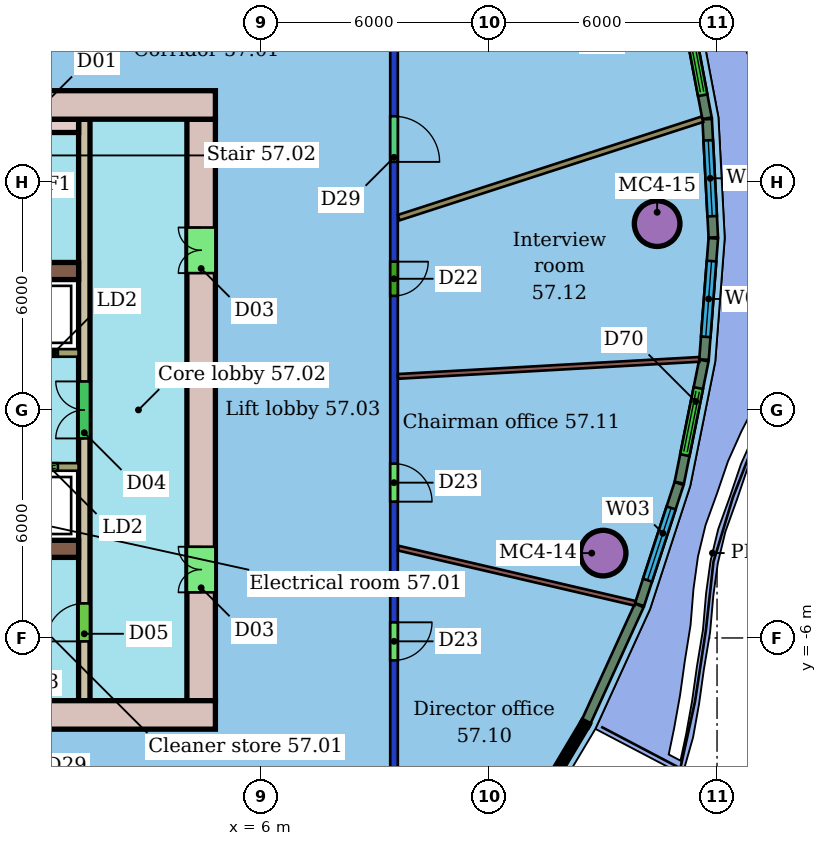
"""IFC4 building model, lengths in metres.
Left out: names, types, materials, properties, quantities, classifications, styles, units other than length and angle.
Written with IfcOpenShell. Run it as: python <this file> out.ifc"""

import sys

from ifc_helpers import new_model, si_unit, direction, frame, frame_2d, origin, origin_2d, place, context, subcontext, project, spatial, rectangle, hollow_circle, extrude, element, fill, save


model = new_model("IFC4")
c1 = context("Model", 3, precision=1e-05, world=origin(), true_north=direction((0.0, 1.0)))
c2 = subcontext(c1, "Body", "Model", "MODEL_VIEW")
j1 = project(units=[si_unit("LENGTHUNIT", "METRE"), si_unit("PLANEANGLEUNIT", "RADIAN")], contexts=[c1])
p1 = place(None, origin())
s1 = spatial("IfcSite", under=j1, at=p1, CompositionType="ELEMENT")
p2 = place(p1, origin())
s2 = spatial("IfcBuilding", under=s1, at=p2, CompositionType="ELEMENT")
p3 = place(p2, frame((0.0, 0.0, 231.7)))
s3 = spatial("IfcBuildingStorey", under=s2, at=p3, CompositionType="ELEMENT", Elevation=231.7)
for number, where, z_axis, x_axis in (
    (1, (15.003, -3.768, 0.0), (0.0, 0.0, 1.0), (1.0, 0.0, 0.0)),
    (2, (16.424, 4.901, 0.0), (0.0, 0.0, 1.0), (1.0, 0.0, 0.0)),
):
    element("IfcColumn", number, at=place(p3, frame(where, z_axis=z_axis, x_axis=x_axis)), inside=s3, PredefinedType="COLUMN", context=c2, shape_type="SweptSolid", body=[
        extrude(hollow_circle(Radius=0.6, WallThickness=0.045, at=origin_2d()), origin(), (0.0, 0.0, 1.0), 3.45),
    ])
p4 = place(p3, frame((9.5, 10.4, 0.0), z_axis=(0.0, 0.0, 1.0), x_axis=(0.0, -1.0, 0.0)))
e3 = element("IfcWall", 3, at=p4, inside=s3, PredefinedType="PARTITIONING", context=c2, shape_type="SweptSolid", body=[
    extrude(rectangle(XDim=20.8, YDim=0.2, at=frame_2d((10.4, 0.0))), origin(), (0.0, 0.0, 1.0), 3.05),
])
p5 = place(p4, frame((15.989, 0.0, 0.0)))
e4 = element("IfcOpeningElement", 4, at=p5, cuts=e3, PredefinedType="OPENING", context=c2, shape_type="SweptSolid", body=[
    extrude(rectangle(XDim=1.0, YDim=2.4, at=frame_2d((0.5, 1.2))), frame((0.0, 0.11, 0.0), z_axis=(0.0, -1.0, 0.0), x_axis=(1.0, 0.0, 0.0)), (0.0, 0.0, 1.0), 0.22),
])
p6 = place(p4, frame((11.814, 0.0, 0.0)))
e5 = element("IfcOpeningElement", 5, at=p6, cuts=e3, PredefinedType="OPENING", context=c2, shape_type="SweptSolid", body=[
    extrude(rectangle(XDim=1.0, YDim=2.4, at=frame_2d((0.5, 1.2))), frame((0.0, 0.11, 0.0), z_axis=(0.0, -1.0, 0.0), x_axis=(1.0, 0.0, 0.0)), (0.0, 0.0, 1.0), 0.22),
])
p7 = place(p4, frame((6.499, 0.0, 0.0)))
e6 = element("IfcOpeningElement", 6, at=p7, cuts=e3, PredefinedType="OPENING", context=c2, shape_type="SweptSolid", body=[
    extrude(rectangle(XDim=0.9, YDim=2.1, at=frame_2d((0.45, 1.05))), frame((0.0, 0.11, 0.0), z_axis=(0.0, -1.0, 0.0), x_axis=(1.0, 0.0, 0.0)), (0.0, 0.0, 1.0), 0.22),
])
p8 = place(p4, frame((2.673, 0.0, 0.0)))
e7 = element("IfcOpeningElement", 7, at=p8, cuts=e3, PredefinedType="OPENING", context=c2, shape_type="SweptSolid", body=[
    extrude(rectangle(XDim=1.2, YDim=2.4, at=frame_2d((0.6, 1.2))), frame((0.0, 0.11, 0.0), z_axis=(0.0, -1.0, 0.0), x_axis=(1.0, 0.0, 0.0)), (0.0, 0.0, 1.0), 0.22),
])
p9 = place(p3, frame((15.841, -5.087, 0.0), z_axis=(0.0, 0.0, 1.0), x_axis=(-0.973929013139, 0.226852986241, 0.0)))
e8 = element("IfcWall", 8, at=p9, inside=s3, PredefinedType="PARTITIONING", context=c2, shape_type="SweptSolid", body=[
    extrude(rectangle(XDim=6.394, YDim=0.125, at=frame_2d((3.197, 0.0))), origin(), (0.0, 0.0, 1.0), 3.45),
])
p10 = place(p3, frame((17.532, 1.33, 0.0), z_axis=(0.0, 0.0, 1.0), x_axis=(-0.99840760058, -0.056411551161, 0.0)))
e9 = element("IfcWall", 9, at=p10, inside=s3, PredefinedType="PARTITIONING", context=c2, shape_type="SweptSolid", body=[
    extrude(rectangle(XDim=7.942, YDim=0.125, at=frame_2d((3.971, 0.0))), origin(), (0.0, 0.0, 1.0), 3.45),
])
p11 = place(p3, frame((17.615, 7.648, 0.0), z_axis=(0.0, 0.0, 1.0), x_axis=(-0.951351351351, -0.308108108108, 0.0)))
e10 = element("IfcWall", 10, at=p11, inside=s3, PredefinedType="PARTITIONING", context=c2, shape_type="SweptSolid", body=[
    extrude(rectangle(XDim=8.401, YDim=0.15, at=frame_2d((4.2, 0.0))), origin(), (0.0, 0.0, 1.0), 3.45),
])
p12 = place(p3, frame((14.556, -8.202, 0.0), z_axis=(0.0, 0.0, 1.0), x_axis=(0.415284514337, 0.909691580785, 0.0)))
e11 = element("IfcWall", 11, at=p12, inside=s3, PredefinedType="SOLIDWALL", context=c2, shape_type="SweptSolid", body=[
    extrude(rectangle(XDim=3.363, YDim=0.25, at=frame_2d((1.682, 0.0))), origin(), (0.0, 0.0, 1.0), 3.1),
])
p13 = place(p3, frame((15.961, -5.122, 0.0), z_axis=(0.0, 0.0, 1.0), x_axis=(0.310298321168, 0.950639233295, 0.0)))
e12 = element("IfcWall", 12, at=p13, inside=s3, PredefinedType="SOLIDWALL", context=c2, shape_type="SweptSolid", body=[
    extrude(rectangle(XDim=3.351, YDim=0.25, at=frame_2d((1.676, 0.0))), origin(), (0.0, 0.0, 1.0), 3.1),
])
p14 = place(p13, frame((0.676, 0.0, 0.9)))
e13 = element("IfcOpeningElement", 13, at=p14, cuts=e12, PredefinedType="OPENING", context=c2, shape_type="SweptSolid", body=[
    extrude(rectangle(XDim=2.0, YDim=2.1, at=frame_2d((1.0, 1.05))), frame((0.0, 0.135, 0.0), z_axis=(0.0, -1.0, 0.0), x_axis=(1.0, 0.0, 0.0)), (0.0, 0.0, 1.0), 0.27),
])
p15 = place(p3, frame((17.007, -1.915, 0.0), z_axis=(0.0, 0.0, 1.0), x_axis=(0.197275160693, 0.980348158041, 0.0)))
e14 = element("IfcWall", 14, at=p15, inside=s3, PredefinedType="SOLIDWALL", context=c2, shape_type="SweptSolid", body=[
    extrude(rectangle(XDim=3.281, YDim=0.25, at=frame_2d((1.64, 0.0))), origin(), (0.0, 0.0, 1.0), 3.1),
])
p16 = place(p15, frame((0.74, 0.0, 0.0)))
e15 = element("IfcOpeningElement", 15, at=p16, cuts=e14, PredefinedType="OPENING", context=c2, shape_type="SweptSolid", body=[
    extrude(rectangle(XDim=1.8, YDim=2.4, at=frame_2d((0.9, 1.2))), frame((0.0, 0.135, 0.0), z_axis=(0.0, -1.0, 0.0), x_axis=(1.0, 0.0, 0.0)), (0.0, 0.0, 1.0), 0.27),
])
p17 = place(p3, frame((17.657, 1.324, 0.0), z_axis=(0.0, 0.0, 1.0), x_axis=(0.076358161895, 0.997080453681, 0.0)))
e16 = element("IfcWall", 16, at=p17, inside=s3, PredefinedType="SOLIDWALL", context=c2, shape_type="SweptSolid", body=[
    extrude(rectangle(XDim=3.2, YDim=0.25, at=frame_2d((1.6, 0.0))), origin(), (0.0, 0.0, 1.0), 3.1),
])
p18 = place(p17, frame((0.6, 0.0, 0.9)))
e17 = element("IfcOpeningElement", 17, at=p18, cuts=e16, PredefinedType="OPENING", context=c2, shape_type="SweptSolid", body=[
    extrude(rectangle(XDim=2.0, YDim=2.1, at=frame_2d((1.0, 1.05))), frame((0.0, 0.135, 0.0), z_axis=(0.0, -1.0, 0.0), x_axis=(1.0, 0.0, 0.0)), (0.0, 0.0, 1.0), 0.27),
])
p19 = place(p3, frame((17.902, 4.54, 0.0), z_axis=(0.0, 0.0, 1.0), x_axis=(-0.051884190685, 0.99865310832, 0.0)))
e18 = element("IfcWall", 18, at=p19, inside=s3, PredefinedType="SOLIDWALL", context=c2, shape_type="SweptSolid", body=[
    extrude(rectangle(XDim=3.115, YDim=0.25, at=frame_2d((1.558, 0.0))), origin(), (0.0, 0.0, 1.0), 3.1),
])
p20 = place(p19, frame((0.558, 0.0, 0.9)))
e19 = element("IfcOpeningElement", 19, at=p20, cuts=e18, PredefinedType="OPENING", context=c2, shape_type="SweptSolid", body=[
    extrude(rectangle(XDim=2.0, YDim=2.1, at=frame_2d((1.0, 1.05))), frame((0.0, 0.135, 0.0), z_axis=(0.0, -1.0, 0.0), x_axis=(1.0, 0.0, 0.0)), (0.0, 0.0, 1.0), 0.27),
])
p21 = place(p3, frame((17.737, 7.675, 0.0), z_axis=(0.0, 0.0, 1.0), x_axis=(-0.186112401934, 0.982528459561, 0.0)))
e20 = element("IfcWall", 20, at=p21, inside=s3, PredefinedType="SOLIDWALL", context=c2, shape_type="SweptSolid", body=[
    extrude(rectangle(XDim=3.03, YDim=0.25, at=frame_2d((1.515, 0.0))), origin(), (0.0, 0.0, 1.0), 3.1),
])
p22 = place(p21, frame((0.615, 0.0, 0.0)))
e21 = element("IfcOpeningElement", 21, at=p22, cuts=e20, PredefinedType="OPENING", context=c2, shape_type="SweptSolid", body=[
    extrude(rectangle(XDim=1.8, YDim=2.4, at=frame_2d((0.9, 1.2))), frame((0.0, 0.135, 0.0), z_axis=(0.0, -1.0, 0.0), x_axis=(1.0, 0.0, 0.0)), (0.0, 0.0, 1.0), 0.27),
])
p23 = place(p3, frame((4.8, 8.025, 0.0), z_axis=(0.0, 0.0, 1.0), x_axis=(-1.0, 0.0, 0.0)))
e22 = element("IfcWall", 22, at=p23, inside=s3, PredefinedType="SHEAR", context=c2, shape_type="SweptSolid", body=[
    extrude(rectangle(XDim=10.8, YDim=0.75, at=frame_2d((5.4, 0.0))), origin(), (0.0, 0.0, 1.0), 3.3),
])
p24 = place(p23, frame((4.4, 0.0, 0.0)))
e23 = element("IfcOpeningElement", 23, at=p24, cuts=e22, PredefinedType="OPENING", context=c2, shape_type="SweptSolid", body=[
    extrude(rectangle(XDim=1.2, YDim=2.1, at=frame_2d((0.6, 1.05))), frame((0.0, 0.385, 0.0), z_axis=(0.0, -1.0, 0.0), x_axis=(1.0, 0.0, 0.0)), (0.0, 0.0, 1.0), 0.77),
])
p25 = place(p3, frame((-16.8, -8.025, 0.0), z_axis=(0.0, 0.0, 1.0), x_axis=(1.0, 0.0, 0.0)))
e24 = element("IfcWall", 24, at=p25, inside=s3, PredefinedType="SHEAR", context=c2, shape_type="SweptSolid", body=[
    extrude(rectangle(XDim=21.6, YDim=0.75, at=frame_2d((10.8, 0.0))), origin(), (0.0, 0.0, 1.0), 3.3),
])
p26 = place(p25, frame((4.8, 0.0, 0.0)))
e25 = element("IfcOpeningElement", 25, at=p26, cuts=e24, PredefinedType="OPENING", context=c2, shape_type="SweptSolid", body=[
    extrude(rectangle(XDim=1.2, YDim=2.1, at=frame_2d((0.6, 1.05))), frame((0.0, 0.385, 0.0), z_axis=(0.0, -1.0, 0.0), x_axis=(1.0, 0.0, 0.0)), (0.0, 0.0, 1.0), 0.77),
])
p27 = place(p3, frame((4.425, -7.65, 0.0), z_axis=(0.0, 0.0, 1.0), x_axis=(0.0, 1.0, 0.0)))
e26 = element("IfcWall", 26, at=p27, inside=s3, PredefinedType="SHEAR", context=c2, shape_type="SweptSolid", body=[
    extrude(rectangle(XDim=15.3, YDim=0.75, at=frame_2d((7.65, 0.0))), origin(), (0.0, 0.0, 1.0), 3.3),
])
p28 = place(p27, frame((2.85, 0.0, 0.0)))
e27 = element("IfcOpeningElement", 27, at=p28, cuts=e26, PredefinedType="OPENING", context=c2, shape_type="SweptSolid", body=[
    extrude(rectangle(XDim=1.2, YDim=2.1, at=frame_2d((0.6, 1.05))), frame((0.0, 0.385, 0.0), z_axis=(0.0, -1.0, 0.0), x_axis=(1.0, 0.0, 0.0)), (0.0, 0.0, 1.0), 0.77),
])
p29 = place(p27, frame((11.25, 0.0, 0.0)))
e28 = element("IfcOpeningElement", 28, at=p29, cuts=e26, PredefinedType="OPENING", context=c2, shape_type="SweptSolid", body=[
    extrude(rectangle(XDim=1.2, YDim=2.1, at=frame_2d((0.6, 1.05))), frame((0.0, 0.385, 0.0), z_axis=(0.0, -1.0, 0.0), x_axis=(1.0, 0.0, 0.0)), (0.0, 0.0, 1.0), 0.77),
])
for number, where, z_axis, x_axis in (
    (29, (-6.0, 3.655, 0.0), (0.0, 0.0, 1.0), (1.0, 0.0, 0.0)),
    (30, (-6.0, -3.655, 0.0), (0.0, 0.0, 1.0), (1.0, 0.0, 0.0)),
):
    element("IfcWall", number, at=place(p3, frame(where, z_axis=z_axis, x_axis=x_axis)), inside=s3, PredefinedType="SHEAR", context=c2, shape_type="SweptSolid", body=[
        extrude(rectangle(XDim=7.2, YDim=0.45, at=frame_2d((3.6, 0.0))), origin(), (0.0, 0.0, 1.0), 3.3),
    ])
p30 = place(p3, frame((1.35, -7.65, 0.0), z_axis=(0.0, 0.0, 1.0), x_axis=(0.0, 1.0, 0.0)))
e31 = element("IfcWall", 31, at=p30, inside=s3, PredefinedType="SHEAR", context=c2, shape_type="SweptSolid", body=[
    extrude(rectangle(XDim=15.3, YDim=0.3, at=frame_2d((7.65, 0.0))), origin(), (0.0, 0.0, 1.0), 3.3),
])
p31 = place(p30, frame((1.56, 0.0, 0.0)))
e32 = element("IfcOpeningElement", 32, at=p31, cuts=e31, PredefinedType="OPENING", context=c2, shape_type="SweptSolid", body=[
    extrude(rectangle(XDim=1.0, YDim=2.1, at=frame_2d((0.5, 1.05))), frame((0.0, 0.16, 0.0), z_axis=(0.0, -1.0, 0.0), x_axis=(1.0, 0.0, 0.0)), (0.0, 0.0, 1.0), 0.32),
])
p32 = place(p30, frame((6.9, 0.0, 0.0)))
e33 = element("IfcOpeningElement", 33, at=p32, cuts=e31, PredefinedType="OPENING", context=c2, shape_type="SweptSolid", body=[
    extrude(rectangle(XDim=1.5, YDim=2.1, at=frame_2d((0.75, 1.05))), frame((0.0, 0.16, 0.0), z_axis=(0.0, -1.0, 0.0), x_axis=(1.0, 0.0, 0.0)), (0.0, 0.0, 1.0), 0.32),
])
p33 = place(p3, frame((-13.2, 1.5, 0.0), z_axis=(0.0, 0.0, 1.0), x_axis=(1.0, 0.0, 0.0)))
e34 = element("IfcWall", 34, at=p33, inside=s3, PredefinedType="SHEAR", context=c2, shape_type="SweptSolid", body=[
    extrude(rectangle(XDim=14.4, YDim=0.2, at=frame_2d((7.2, 0.0))), origin(), (0.0, 0.0, 1.0), 3.3),
])
p34 = place(p33, frame((10.312, 0.0, 0.0)))
e35 = element("IfcOpeningElement", 35, at=p34, cuts=e34, PredefinedType="OPENING", context=c2, shape_type="SweptSolid", body=[
    extrude(rectangle(XDim=1.1, YDim=2.1, at=frame_2d((0.55, 1.05))), frame((0.0, 0.11, 0.0), z_axis=(0.0, -1.0, 0.0), x_axis=(1.0, 0.0, 0.0)), (0.0, 0.0, 1.0), 0.22),
])
p35 = place(p33, frame((12.754, 0.0, 0.0)))
e36 = element("IfcOpeningElement", 36, at=p35, cuts=e34, PredefinedType="OPENING", context=c2, shape_type="SweptSolid", body=[
    extrude(rectangle(XDim=1.1, YDim=2.1, at=frame_2d((0.55, 1.05))), frame((0.0, 0.11, 0.0), z_axis=(0.0, -1.0, 0.0), x_axis=(1.0, 0.0, 0.0)), (0.0, 0.0, 1.0), 0.22),
])
p36 = place(p33, frame((0.15, 0.0, 0.0)))
e37 = element("IfcOpeningElement", 37, at=p36, cuts=e34, PredefinedType="OPENING", context=c2, shape_type="SweptSolid", body=[
    extrude(rectangle(XDim=0.9, YDim=2.1, at=frame_2d((0.45, 1.05))), frame((0.0, 0.11, 0.0), z_axis=(0.0, -1.0, 0.0), x_axis=(1.0, 0.0, 0.0)), (0.0, 0.0, 1.0), 0.22),
])
p37 = place(p33, frame((3.365, 0.0, 0.0)))
e38 = element("IfcOpeningElement", 38, at=p37, cuts=e34, PredefinedType="OPENING", context=c2, shape_type="SweptSolid", body=[
    extrude(rectangle(XDim=1.0, YDim=2.1, at=frame_2d((0.5, 1.05))), frame((0.0, 0.11, 0.0), z_axis=(0.0, -1.0, 0.0), x_axis=(1.0, 0.0, 0.0)), (0.0, 0.0, 1.0), 0.22),
])
p38 = place(p33, frame((8.467, 0.0, 0.0)))
e39 = element("IfcOpeningElement", 39, at=p38, cuts=e34, PredefinedType="OPENING", context=c2, shape_type="SweptSolid", body=[
    extrude(rectangle(XDim=0.9, YDim=2.1, at=frame_2d((0.45, 1.05))), frame((0.0, 0.11, 0.0), z_axis=(0.0, -1.0, 0.0), x_axis=(1.0, 0.0, 0.0)), (0.0, 0.0, 1.0), 0.22),
])
p39 = place(p3, frame((1.2, -1.5, 0.0), z_axis=(0.0, 0.0, 1.0), x_axis=(-1.0, 0.0, 0.0)))
e40 = element("IfcWall", 40, at=p39, inside=s3, PredefinedType="SHEAR", context=c2, shape_type="SweptSolid", body=[
    extrude(rectangle(XDim=14.4, YDim=0.2, at=frame_2d((7.2, 0.0))), origin(), (0.0, 0.0, 1.0), 3.3),
])
p40 = place(p39, frame((7.821, 0.0, 0.0)))
e41 = element("IfcOpeningElement", 41, at=p40, cuts=e40, PredefinedType="OPENING", context=c2, shape_type="SweptSolid", body=[
    extrude(rectangle(XDim=1.2, YDim=2.1, at=frame_2d((0.6, 1.05))), frame((0.0, 0.11, 0.0), z_axis=(0.0, -1.0, 0.0), x_axis=(1.0, 0.0, 0.0)), (0.0, 0.0, 1.0), 0.22),
])
p41 = place(p39, frame((0.546, 0.0, 0.0)))
e42 = element("IfcOpeningElement", 42, at=p41, cuts=e40, PredefinedType="OPENING", context=c2, shape_type="SweptSolid", body=[
    extrude(rectangle(XDim=1.1, YDim=2.1, at=frame_2d((0.55, 1.05))), frame((0.0, 0.11, 0.0), z_axis=(0.0, -1.0, 0.0), x_axis=(1.0, 0.0, 0.0)), (0.0, 0.0, 1.0), 0.22),
])
p42 = place(p39, frame((4.335, 0.0, 0.0)))
e43 = element("IfcOpeningElement", 43, at=p42, cuts=e40, PredefinedType="OPENING", context=c2, shape_type="SweptSolid", body=[
    extrude(rectangle(XDim=1.0, YDim=2.1, at=frame_2d((0.5, 1.05))), frame((0.0, 0.11, 0.0), z_axis=(0.0, -1.0, 0.0), x_axis=(1.0, 0.0, 0.0)), (0.0, 0.0, 1.0), 0.22),
])
p43 = place(p39, frame((2.592, 0.0, 0.0)))
e44 = element("IfcOpeningElement", 44, at=p43, cuts=e40, PredefinedType="OPENING", context=c2, shape_type="SweptSolid", body=[
    extrude(rectangle(XDim=1.0, YDim=2.1, at=frame_2d((0.5, 1.05))), frame((0.0, 0.11, 0.0), z_axis=(0.0, -1.0, 0.0), x_axis=(1.0, 0.0, 0.0)), (0.0, 0.0, 1.0), 0.22),
])
p44 = place(p3, frame((0.4, 7.475, 0.0), z_axis=(0.0, 0.0, 1.0), x_axis=(1.0, 0.0, 0.0)))
e45 = element("IfcWall", 45, at=p44, inside=s3, PredefinedType="SHEAR", context=c2, shape_type="SweptSolid", body=[
    extrude(rectangle(XDim=0.8, YDim=0.35, at=frame_2d((0.4, 0.0))), origin(), (0.0, 0.0, 1.0), 3.3),
])
p45 = place(p5, origin())
e46 = element("IfcDoor", 46, at=p45, inside=s3, OperationType="SINGLE_SWING_LEFT", PredefinedType="DOOR", context=c2, shape_type="SweptSolid", body=[
    extrude(rectangle(XDim=1.0, YDim=2.4, at=frame_2d((0.5, 1.2))), frame((0.0, 0.025, 0.0), z_axis=(0.0, -1.0, 0.0), x_axis=(1.0, 0.0, 0.0)), (0.0, 0.0, 1.0), 0.05),
])
fill(e4, e46)
p46 = place(p6, origin())
e47 = element("IfcDoor", 47, at=p46, inside=s3, OperationType="SINGLE_SWING_RIGHT", PredefinedType="DOOR", context=c2, shape_type="SweptSolid", body=[
    extrude(rectangle(XDim=1.0, YDim=2.4, at=frame_2d((0.5, 1.2))), frame((0.0, 0.025, 0.0), z_axis=(0.0, -1.0, 0.0), x_axis=(1.0, 0.0, 0.0)), (0.0, 0.0, 1.0), 0.05),
])
fill(e5, e47)
p47 = place(p7, origin())
e48 = element("IfcDoor", 48, at=p47, inside=s3, OperationType="SINGLE_SWING_LEFT", PredefinedType="DOOR", context=c2, shape_type="SweptSolid", body=[
    extrude(rectangle(XDim=0.9, YDim=2.1, at=frame_2d((0.45, 1.05))), frame((0.0, 0.025, 0.0), z_axis=(0.0, -1.0, 0.0), x_axis=(1.0, 0.0, 0.0)), (0.0, 0.0, 1.0), 0.05),
])
fill(e6, e48)
p48 = place(p8, origin())
e49 = element("IfcDoor", 49, at=p48, inside=s3, OperationType="SINGLE_SWING_RIGHT", PredefinedType="DOOR", context=c2, shape_type="SweptSolid", body=[
    extrude(rectangle(XDim=1.2, YDim=2.4, at=frame_2d((0.6, 1.2))), frame((0.0, 0.025, 0.0), z_axis=(0.0, -1.0, 0.0), x_axis=(1.0, 0.0, 0.0)), (0.0, 0.0, 1.0), 0.05),
])
fill(e7, e49)
p49 = place(p14, origin())
e50 = element("IfcWindow", 50, at=p49, inside=s3, PartitioningType="SINGLE_PANEL", PredefinedType="WINDOW", context=c2, shape_type="SweptSolid", body=[
    extrude(rectangle(XDim=2.0, YDim=2.1, at=frame_2d((1.0, 1.05))), frame((0.0, 0.03, 0.0), z_axis=(0.0, -1.0, 0.0), x_axis=(1.0, 0.0, 0.0)), (0.0, 0.0, 1.0), 0.06),
])
fill(e13, e50)
p50 = place(p16, origin())
e51 = element("IfcDoor", 51, at=p50, inside=s3, OperationType="DOUBLE_DOOR_SLIDING", PredefinedType="DOOR", context=c2, shape_type="SweptSolid", body=[
    extrude(rectangle(XDim=1.8, YDim=2.4, at=frame_2d((0.9, 1.2))), frame((0.0, 0.025, 0.0), z_axis=(0.0, -1.0, 0.0), x_axis=(1.0, 0.0, 0.0)), (0.0, 0.0, 1.0), 0.05),
])
fill(e15, e51)
p51 = place(p18, origin())
e52 = element("IfcWindow", 52, at=p51, inside=s3, PartitioningType="SINGLE_PANEL", PredefinedType="WINDOW", context=c2, shape_type="SweptSolid", body=[
    extrude(rectangle(XDim=2.0, YDim=2.1, at=frame_2d((1.0, 1.05))), frame((0.0, 0.03, 0.0), z_axis=(0.0, -1.0, 0.0), x_axis=(1.0, 0.0, 0.0)), (0.0, 0.0, 1.0), 0.06),
])
fill(e17, e52)
p52 = place(p20, origin())
e53 = element("IfcWindow", 53, at=p52, inside=s3, PartitioningType="SINGLE_PANEL", PredefinedType="WINDOW", context=c2, shape_type="SweptSolid", body=[
    extrude(rectangle(XDim=2.0, YDim=2.1, at=frame_2d((1.0, 1.05))), frame((0.0, 0.03, 0.0), z_axis=(0.0, -1.0, 0.0), x_axis=(1.0, 0.0, 0.0)), (0.0, 0.0, 1.0), 0.06),
])
fill(e19, e53)
p53 = place(p22, origin())
e54 = element("IfcDoor", 54, at=p53, inside=s3, OperationType="DOUBLE_DOOR_SLIDING", PredefinedType="DOOR", context=c2, shape_type="SweptSolid", body=[
    extrude(rectangle(XDim=1.8, YDim=2.4, at=frame_2d((0.9, 1.2))), frame((0.0, 0.025, 0.0), z_axis=(0.0, -1.0, 0.0), x_axis=(1.0, 0.0, 0.0)), (0.0, 0.0, 1.0), 0.05),
])
fill(e21, e54)
p54 = place(p28, origin())
e55 = element("IfcDoor", 55, at=p54, inside=s3, OperationType="DOUBLE_DOOR_SINGLE_SWING", PredefinedType="NOTDEFINED", context=c2, shape_type="SweptSolid", body=[
    extrude(rectangle(XDim=1.2, YDim=2.1, at=frame_2d((0.6, 1.05))), frame((0.0, 0.025, 0.0), z_axis=(0.0, -1.0, 0.0), x_axis=(1.0, 0.0, 0.0)), (0.0, 0.0, 1.0), 0.05),
])
fill(e27, e55)
p55 = place(p29, origin())
e56 = element("IfcDoor", 56, at=p55, inside=s3, OperationType="DOUBLE_DOOR_SINGLE_SWING", PredefinedType="NOTDEFINED", context=c2, shape_type="SweptSolid", body=[
    extrude(rectangle(XDim=1.2, YDim=2.1, at=frame_2d((0.6, 1.05))), frame((0.0, 0.025, 0.0), z_axis=(0.0, -1.0, 0.0), x_axis=(1.0, 0.0, 0.0)), (0.0, 0.0, 1.0), 0.05),
])
fill(e28, e56)
p56 = place(p31, origin())
e57 = element("IfcDoor", 57, at=p56, inside=s3, OperationType="SINGLE_SWING_LEFT", PredefinedType="NOTDEFINED", context=c2, shape_type="SweptSolid", body=[
    extrude(rectangle(XDim=1.0, YDim=2.1, at=frame_2d((0.5, 1.05))), frame((0.0, 0.025, 0.0), z_axis=(0.0, -1.0, 0.0), x_axis=(1.0, 0.0, 0.0)), (0.0, 0.0, 1.0), 0.05),
])
fill(e32, e57)
p57 = place(p32, origin())
e58 = element("IfcDoor", 58, at=p57, inside=s3, OperationType="DOUBLE_DOOR_SINGLE_SWING", PredefinedType="NOTDEFINED", context=c2, shape_type="SweptSolid", body=[
    extrude(rectangle(XDim=1.5, YDim=2.1, at=frame_2d((0.75, 1.05))), frame((0.0, 0.025, 0.0), z_axis=(0.0, -1.0, 0.0), x_axis=(1.0, 0.0, 0.0)), (0.0, 0.0, 1.0), 0.05),
])
fill(e33, e58)
p58 = place(p35, origin())
e59 = element("IfcDoor", 59, at=p58, inside=s3, OperationType="DOUBLE_DOOR_SLIDING", PredefinedType="NOTDEFINED", context=c2, shape_type="SweptSolid", body=[
    extrude(rectangle(XDim=1.1, YDim=2.1, at=frame_2d((0.55, 1.05))), frame((0.0, 0.025, 0.0), z_axis=(0.0, -1.0, 0.0), x_axis=(1.0, 0.0, 0.0)), (0.0, 0.0, 1.0), 0.05),
])
fill(e36, e59)
p59 = place(p41, origin())
e60 = element("IfcDoor", 60, at=p59, inside=s3, OperationType="DOUBLE_DOOR_SLIDING", PredefinedType="NOTDEFINED", context=c2, shape_type="SweptSolid", body=[
    extrude(rectangle(XDim=1.1, YDim=2.1, at=frame_2d((0.55, 1.05))), frame((0.0, 0.025, 0.0), z_axis=(0.0, -1.0, 0.0), x_axis=(1.0, 0.0, 0.0)), (0.0, 0.0, 1.0), 0.05),
])
fill(e42, e60)
save(model, sys.argv[1])
